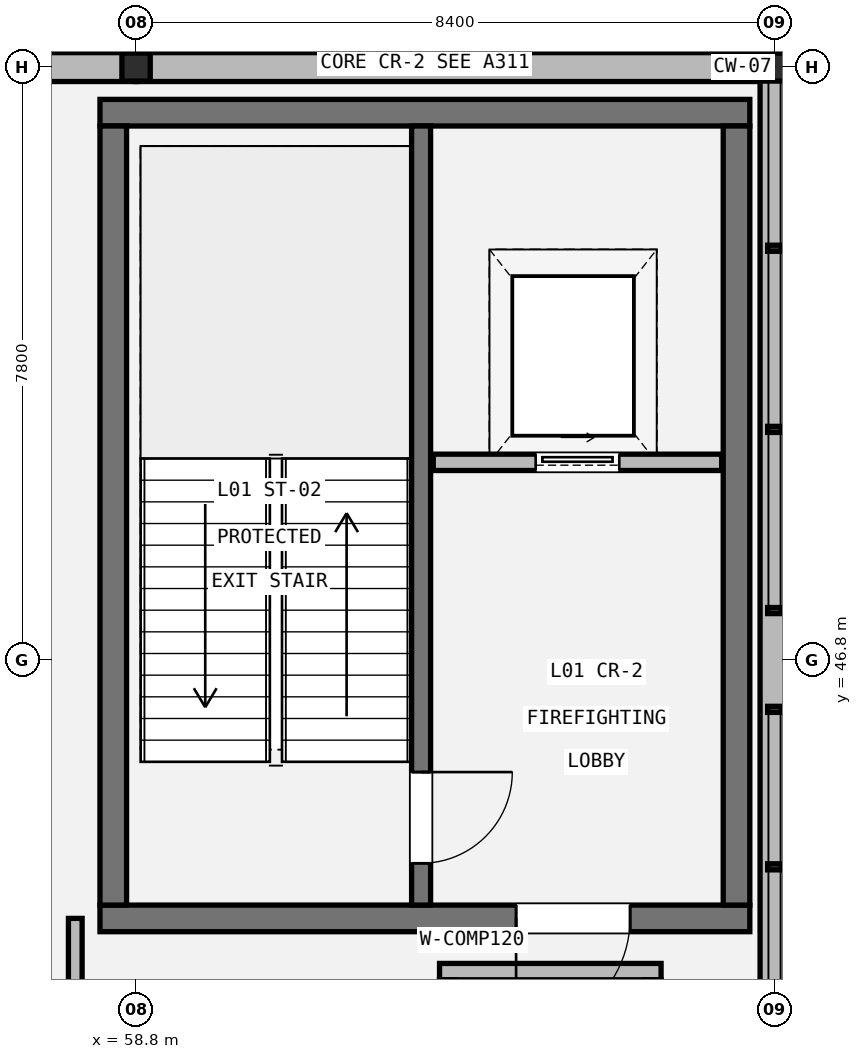
"""IFC4 building model, lengths in metres.
Left out: names, types, materials, properties, quantities, classifications, styles, units other than length and angle.
Written with IfcOpenShell. Run it as: python <this file> out.ifc"""

import sys

from ifc_helpers import new_model, si_unit, direction, frame, frame_2d, origin, origin_2d, place, context, subcontext, project, spatial, rectangle, i_section, extrude, element, fill, save


model = new_model("IFC4")
c1 = context("Model", 3, precision=1e-05, world=origin(), true_north=direction((0.0, 1.0)))
c2 = subcontext(c1, "Body", "Model", "MODEL_VIEW")
j1 = project(units=[si_unit("LENGTHUNIT", "METRE"), si_unit("PLANEANGLEUNIT", "RADIAN")], contexts=[c1])
p1 = place(None, origin())
s1 = spatial("IfcSite", under=j1, at=p1, CompositionType="ELEMENT")
p2 = place(p1, origin())
s2 = spatial("IfcBuilding", under=s1, at=p2, CompositionType="ELEMENT")
p3 = place(p2, frame((0.0, 0.0, 5.4)))
s3 = spatial("IfcBuildingStorey", under=s2, at=p3, CompositionType="ELEMENT", Elevation=5.4)
for number, where, z_axis, x_axis in (
    (1, (58.8, 54.6, 0.0), (0.0, 0.0, 1.0), (1.0, 0.0, 0.0)),
    (2, (67.2, 54.6, 0.0), (0.0, 0.0, 1.0), (1.0, 0.0, 0.0)),
):
    element("IfcColumn", number, at=place(p3, frame(where, z_axis=z_axis, x_axis=x_axis)), inside=s3, PredefinedType="COLUMN", context=c2, shape_type="SweptSolid", body=[
        extrude(i_section(OverallWidth=0.373, OverallDepth=0.368, WebThickness=0.014, FlangeThickness=0.024, FilletRadius=0.015, at=origin_2d()), origin(), (0.0, 0.0, 1.0), 4.8),
    ])
p4 = place(p3, frame((50.4, 54.6, 0.0), z_axis=(0.0, 0.0, 1.0), x_axis=(1.0, 0.0, 0.0)))
e3 = element("IfcWall", 3, at=p4, inside=s3, PredefinedType="STANDARD", context=c2, shape_type="SweptSolid", body=[
    extrude(rectangle(XDim=8.4, YDim=0.38, at=frame_2d((4.2, 0.0))), origin(), (0.0, 0.0, 1.0), 4.033),
])
p5 = place(p3, frame((58.8, 54.6, 0.0), z_axis=(0.0, 0.0, 1.0), x_axis=(1.0, 0.0, 0.0)))
e4 = element("IfcWall", 4, at=p5, inside=s3, PredefinedType="STANDARD", context=c2, shape_type="SweptSolid", body=[
    extrude(rectangle(XDim=8.4, YDim=0.38, at=frame_2d((4.2, 0.0))), origin(), (0.0, 0.0, 1.0), 3.802),
])
p6 = place(p3, frame((67.2, 54.6, 0.0), z_axis=(0.0, 0.0, 1.0), x_axis=(0.0, -1.0, 0.0)))
e5 = element("IfcWall", 5, at=p6, inside=s3, PredefinedType="STANDARD", context=c2, shape_type="SweptSolid", body=[
    extrude(rectangle(XDim=15.6, YDim=0.38, at=frame_2d((7.8, 0.0))), origin(), (0.0, 0.0, 1.0), 3.802),
])
p7 = place(p3, frame((66.875, 43.4, 0.0), z_axis=(0.0, 0.0, 1.0), x_axis=(-1.0, 0.0, 0.0)))
e6 = element("IfcWall", 6, at=p7, inside=s3, PredefinedType="SHEAR", context=c2, shape_type="SweptSolid", body=[
    extrude(rectangle(XDim=8.55, YDim=0.35, at=frame_2d((4.275, 0.0))), origin(), (0.0, 0.0, 1.0), 4.58),
])
p8 = place(p7, frame((1.575, 0.0, 0.0)))
e7 = element("IfcOpeningElement", 7, at=p8, cuts=e6, PredefinedType="OPENING", context=c2, shape_type="SweptSolid", body=[
    extrude(rectangle(XDim=1.5, YDim=2.15, at=frame_2d((0.75, 1.075))), frame((0.0, 0.185, 0.0), z_axis=(0.0, -1.0, 0.0), x_axis=(1.0, 0.0, 0.0)), (0.0, 0.0, 1.0), 0.37),
])
p9 = place(p3, frame((58.325, 54.0, 0.0), z_axis=(0.0, 0.0, 1.0), x_axis=(1.0, 0.0, 0.0)))
e8 = element("IfcWall", 8, at=p9, inside=s3, PredefinedType="SHEAR", context=c2, shape_type="SweptSolid", body=[
    extrude(rectangle(XDim=8.55, YDim=0.35, at=frame_2d((4.275, 0.0))), origin(), (0.0, 0.0, 1.0), 4.58),
])
for number, where, z_axis, x_axis in (
    (9, (58.5, 43.575, 0.0), (0.0, 0.0, 1.0), (0.0, 1.0, 0.0)),
    (10, (66.7, 53.825, 0.0), (0.0, 0.0, 1.0), (0.0, -1.0, 0.0)),
):
    element("IfcWall", number, at=place(p3, frame(where, z_axis=z_axis, x_axis=x_axis)), inside=s3, PredefinedType="SHEAR", context=c2, shape_type="SweptSolid", body=[
        extrude(rectangle(XDim=10.25, YDim=0.35, at=frame_2d((5.125, 0.0))), origin(), (0.0, 0.0, 1.0), 4.58),
    ])
p10 = place(p3, frame((62.55, 53.825, 0.0), z_axis=(0.0, 0.0, 1.0), x_axis=(0.0, -1.0, 0.0)))
e11 = element("IfcWall", 11, at=p10, inside=s3, PredefinedType="SHEAR", context=c2, shape_type="SweptSolid", body=[
    extrude(rectangle(XDim=10.25, YDim=0.25, at=frame_2d((5.125, 0.0))), origin(), (0.0, 0.0, 1.0), 4.58),
])
p11 = place(p10, frame((8.5, 0.0, 0.0)))
e12 = element("IfcOpeningElement", 12, at=p11, cuts=e11, PredefinedType="OPENING", context=c2, shape_type="SweptSolid", body=[
    extrude(rectangle(XDim=1.2, YDim=2.15, at=frame_2d((0.6, 1.075))), frame((0.0, 0.135, 0.0), z_axis=(0.0, -1.0, 0.0), x_axis=(1.0, 0.0, 0.0)), (0.0, 0.0, 1.0), 0.27),
])
p12 = place(p3, frame((62.71, 49.4, 0.0), z_axis=(0.0, 0.0, 1.0), x_axis=(1.0, 0.0, 0.0)))
e13 = element("IfcWall", 13, at=p12, inside=s3, PredefinedType="STANDARD", context=c2, shape_type="SweptSolid", body=[
    extrude(rectangle(XDim=3.795, YDim=0.215, at=frame_2d((1.897, 0.0))), origin(), (0.0, 0.0, 1.0), 4.572),
])
p13 = place(p12, frame((1.347, 0.0, 0.0)))
e14 = element("IfcOpeningElement", 14, at=p13, cuts=e13, PredefinedType="OPENING", context=c2, shape_type="SweptSolid", body=[
    extrude(rectangle(XDim=1.1, YDim=2.2, at=frame_2d((0.55, 1.1))), frame((0.0, 0.117, 0.0), z_axis=(0.0, -1.0, 0.0), x_axis=(1.0, 0.0, 0.0)), (0.0, 0.0, 1.0), 0.235),
])
p14 = place(p3, frame((62.792, 42.7, 0.0), z_axis=(0.0, 0.0, 1.0), x_axis=(1.0, 0.0, 0.0)))
e15 = element("IfcWall", 15, at=p14, inside=s3, PredefinedType="STANDARD", context=c2, shape_type="SweptSolid", body=[
    extrude(rectangle(XDim=2.915, YDim=0.215, at=frame_2d((1.458, 0.0))), origin(), (0.0, 0.0, 1.0), 4.572),
])
p15 = place(p3, frame((58.0, 23.4, 0.0), z_axis=(0.0, 0.0, 1.0), x_axis=(0.0, 1.0, 0.0)))
e16 = element("IfcWall", 16, at=p15, inside=s3, PredefinedType="STANDARD", context=c2, shape_type="SweptSolid", body=[
    extrude(rectangle(XDim=20.0, YDim=0.18, at=frame_2d((10.0, 0.0))), origin(), (0.0, 0.0, 1.0), 4.039),
])
p16 = place(p15, frame((13.258, 0.0, 0.0)))
e17 = element("IfcOpeningElement", 17, at=p16, cuts=e16, PredefinedType="OPENING", context=c2, shape_type="SweptSolid", body=[
    extrude(rectangle(XDim=1.06, YDim=2.1, at=frame_2d((0.53, 1.05))), frame((0.0, 0.1, 0.0), z_axis=(0.0, -1.0, 0.0), x_axis=(1.0, 0.0, 0.0)), (0.0, 0.0, 1.0), 0.2),
])
p17 = place(p11, origin())
e18 = element("IfcDoor", 18, at=p17, inside=s3, OperationType="SINGLE_SWING_LEFT", PredefinedType="DOOR", context=c2, shape_type="SweptSolid", body=[
    extrude(rectangle(XDim=1.2, YDim=2.15, at=frame_2d((0.6, 1.075))), frame((0.0, 0.025, 0.0), z_axis=(0.0, -1.0, 0.0), x_axis=(1.0, 0.0, 0.0)), (0.0, 0.0, 1.0), 0.05),
])
fill(e12, e18)
p18 = place(p8, origin())
e19 = element("IfcDoor", 19, at=p18, inside=s3, OperationType="SINGLE_SWING_RIGHT", PredefinedType="DOOR", context=c2, shape_type="SweptSolid", body=[
    extrude(rectangle(XDim=1.5, YDim=2.15, at=frame_2d((0.75, 1.075))), frame((0.0, 0.025, 0.0), z_axis=(0.0, -1.0, 0.0), x_axis=(1.0, 0.0, 0.0)), (0.0, 0.0, 1.0), 0.05),
])
fill(e7, e19)
p19 = place(p13, origin())
e20 = element("IfcDoor", 20, at=p19, inside=s3, OperationType="SLIDING_TO_RIGHT", PredefinedType="DOOR", context=c2, shape_type="SweptSolid", body=[
    extrude(rectangle(XDim=1.1, YDim=2.2, at=frame_2d((0.55, 1.1))), frame((0.0, 0.025, 0.0), z_axis=(0.0, -1.0, 0.0), x_axis=(1.0, 0.0, 0.0)), (0.0, 0.0, 1.0), 0.05),
])
fill(e14, e20)
save(model, sys.argv[1])
